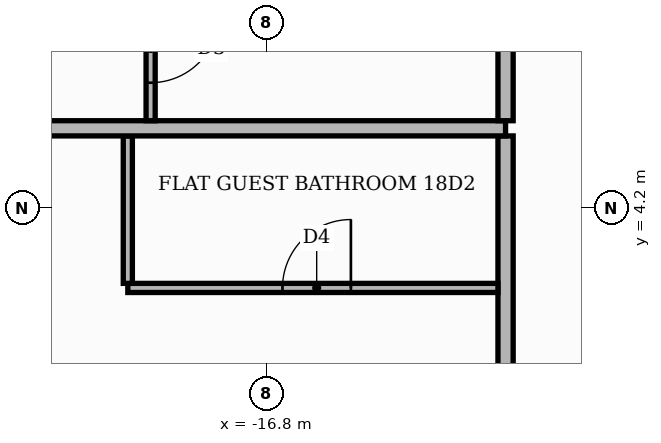
"""IFC4 building model, lengths in metres.
Left out: names, types, materials, properties, quantities, classifications, styles, units other than length and angle.
Written with IfcOpenShell. Run it as: python <this file> out.ifc"""

import sys

from ifc_helpers import new_model, si_unit, direction, frame, frame_2d, origin, place, context, subcontext, project, spatial, rectangle, extrude, element, fill, save


model = new_model("IFC4")
c1 = context("Model", 3, precision=1e-05, world=origin(), true_north=direction((0.0, 1.0)))
c2 = subcontext(c1, "Body", "Model", "MODEL_VIEW")
j1 = project(units=[si_unit("LENGTHUNIT", "METRE"), si_unit("PLANEANGLEUNIT", "RADIAN")], contexts=[c1])
p1 = place(None, origin())
s1 = spatial("IfcSite", under=j1, at=p1, CompositionType="ELEMENT")
p2 = place(p1, origin())
s2 = spatial("IfcBuilding", under=s1, at=p2, CompositionType="ELEMENT")
p3 = place(p2, frame((0.0, 0.0, 79.2)))
s3 = spatial("IfcBuildingStorey", under=s2, at=p3, CompositionType="ELEMENT", Elevation=79.2)
p4 = place(p3, frame((-13.65, -13.55, 0.0), z_axis=(0.0, 0.0, 1.0), x_axis=(0.0, 1.0, 0.0)))
e1 = element("IfcWall", 1, at=p4, inside=s3, PredefinedType="PARTITIONING", context=c2, shape_type="SweptSolid", body=[
    extrude(rectangle(XDim=18.7, YDim=0.2, at=frame_2d((9.35, 0.0))), origin(), (0.0, 0.0, 1.0), 3.48),
])
p5 = place(p4, frame((14.05, 0.0, 0.0)))
e2 = element("IfcOpeningElement", 2, at=p5, cuts=e1, PredefinedType="OPENING", context=c2, shape_type="SweptSolid", body=[
    extrude(rectangle(XDim=1.1, YDim=2.4, at=frame_2d((0.55, 1.2))), frame((0.0, 0.11, 0.0), z_axis=(0.0, -1.0, 0.0), x_axis=(1.0, 0.0, 0.0)), (0.0, 0.0, 1.0), 0.22),
])
p6 = place(p3, frame((-18.62, 3.15, 0.0), z_axis=(0.0, 0.0, 1.0), x_axis=(1.0, 0.0, 0.0)))
e3 = element("IfcWall", 3, at=p6, inside=s3, PredefinedType="PARTITIONING", context=c2, shape_type="SweptSolid", body=[
    extrude(rectangle(XDim=4.87, YDim=0.12, at=frame_2d((2.435, 0.0))), origin(), (0.0, 0.0, 1.0), 3.48),
])
p7 = place(p6, frame((2.035, 0.0, 0.0)))
e4 = element("IfcOpeningElement", 4, at=p7, cuts=e3, PredefinedType="OPENING", context=c2, shape_type="SweptSolid", body=[
    extrude(rectangle(XDim=0.9, YDim=2.1, at=frame_2d((0.45, 1.05))), frame((0.0, 0.07, 0.0), z_axis=(0.0, -1.0, 0.0), x_axis=(1.0, 0.0, 0.0)), (0.0, 0.0, 1.0), 0.14),
])
p8 = place(p3, frame((-18.62, 3.21, 0.0), z_axis=(0.0, 0.0, 1.0), x_axis=(0.0, 1.0, 0.0)))
e5 = element("IfcWall", 5, at=p8, inside=s3, PredefinedType="PARTITIONING", context=c2, shape_type="SweptSolid", body=[
    extrude(rectangle(XDim=1.94, YDim=0.12, at=frame_2d((0.97, 0.0))), origin(), (0.0, 0.0, 1.0), 3.48),
])
p9 = place(p3, frame((-25.42, 5.25, 0.0), z_axis=(0.0, 0.0, 1.0), x_axis=(1.0, 0.0, 0.0)))
e6 = element("IfcWall", 6, at=p9, inside=s3, PredefinedType="PARTITIONING", context=c2, shape_type="SweptSolid", body=[
    extrude(rectangle(XDim=11.77, YDim=0.2, at=frame_2d((5.885, 0.0))), origin(), (0.0, 0.0, 1.0), 3.48),
])
p10 = place(p3, frame((-18.32, 5.35, 0.0), z_axis=(0.0, 0.0, 1.0), x_axis=(0.0, 1.0, 0.0)))
e7 = element("IfcWall", 7, at=p10, inside=s3, PredefinedType="PARTITIONING", context=c2, shape_type="SweptSolid", body=[
    extrude(rectangle(XDim=1.94, YDim=0.12, at=frame_2d((0.97, 0.0))), origin(), (0.0, 0.0, 1.0), 3.48),
])
p11 = place(p10, frame((0.5, 0.0, 0.0)))
e8 = element("IfcOpeningElement", 8, at=p11, cuts=e7, PredefinedType="OPENING", context=c2, shape_type="SweptSolid", body=[
    extrude(rectangle(XDim=0.9, YDim=2.1, at=frame_2d((0.45, 1.05))), frame((0.0, 0.07, 0.0), z_axis=(0.0, -1.0, 0.0), x_axis=(1.0, 0.0, 0.0)), (0.0, 0.0, 1.0), 0.14),
])
p12 = place(p3, frame((-13.65, 5.35, 0.0), z_axis=(0.0, 0.0, 1.0), x_axis=(0.0, 1.0, 0.0)))
e9 = element("IfcWall", 9, at=p12, inside=s3, PredefinedType="PARTITIONING", context=c2, shape_type="SweptSolid", body=[
    extrude(rectangle(XDim=8.2, YDim=0.2, at=frame_2d((4.1, 0.0))), origin(), (0.0, 0.0, 1.0), 3.48),
])
p13 = place(p12, frame((5.65, 0.0, 0.0)))
e10 = element("IfcOpeningElement", 10, at=p13, cuts=e9, PredefinedType="OPENING", context=c2, shape_type="SweptSolid", body=[
    extrude(rectangle(XDim=1.1, YDim=2.4, at=frame_2d((0.55, 1.2))), frame((0.0, 0.11, 0.0), z_axis=(0.0, -1.0, 0.0), x_axis=(1.0, 0.0, 0.0)), (0.0, 0.0, 1.0), 0.22),
])
p14 = place(p11, frame((0.9, 0.0, 0.0), z_axis=(0.0, 0.0, 1.0), x_axis=(-1.0, 0.0, 0.0)))
e11 = element("IfcDoor", 11, at=p14, inside=s3, OperationType="SINGLE_SWING_RIGHT", PredefinedType="DOOR", context=c2, shape_type="SweptSolid", body=[
    extrude(rectangle(XDim=0.9, YDim=2.1, at=frame_2d((0.45, 1.05))), frame((0.0, 0.025, 0.0), z_axis=(0.0, -1.0, 0.0), x_axis=(1.0, 0.0, 0.0)), (0.0, 0.0, 1.0), 0.05),
])
fill(e8, e11)
p15 = place(p7, origin())
e12 = element("IfcDoor", 12, at=p15, inside=s3, OperationType="SINGLE_SWING_RIGHT", PredefinedType="DOOR", context=c2, shape_type="SweptSolid", body=[
    extrude(rectangle(XDim=0.9, YDim=2.1, at=frame_2d((0.45, 1.05))), frame((0.0, 0.025, 0.0), z_axis=(0.0, -1.0, 0.0), x_axis=(1.0, 0.0, 0.0)), (0.0, 0.0, 1.0), 0.05),
])
fill(e4, e12)
save(model, sys.argv[1])
